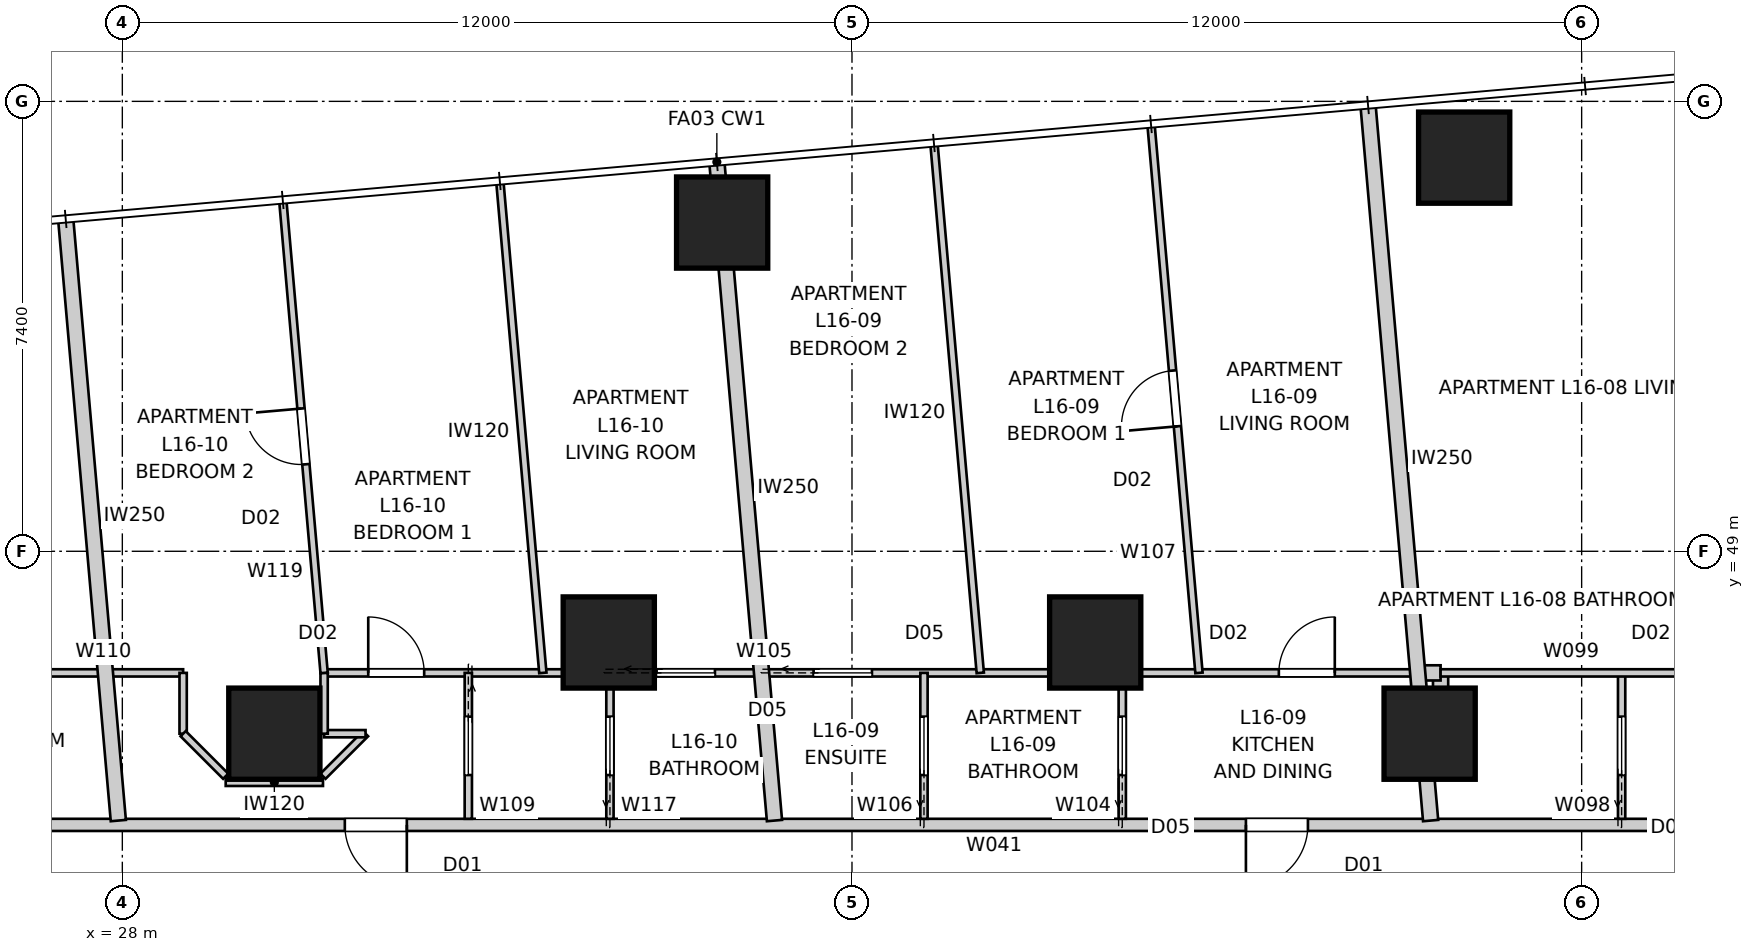
"""IFC4 building model, lengths in metres.
Left out: names, types, materials, properties, quantities, classifications, styles, units other than length and angle.
Written with IfcOpenShell. Run it as: python <this file> out.ifc"""

import sys

from ifc_helpers import new_model, si_unit, direction, frame, frame_2d, origin, origin_2d, place, context, subcontext, project, spatial, rectangle, extrude, element, fill, save


model = new_model("IFC4")
c1 = context("Model", 3, precision=1e-05, world=origin(), true_north=direction((0.0, 1.0)))
c2 = subcontext(c1, "Body", "Model", "MODEL_VIEW")
j1 = project(units=[si_unit("LENGTHUNIT", "METRE"), si_unit("PLANEANGLEUNIT", "RADIAN")], contexts=[c1])
p1 = place(None, origin())
s1 = spatial("IfcSite", under=j1, at=p1, CompositionType="ELEMENT")
p2 = place(p1, origin())
s2 = spatial("IfcBuilding", under=s1, at=p2, CompositionType="ELEMENT")
p3 = place(p2, frame((0.0, 0.0, 60.8)))
s3 = spatial("IfcBuildingStorey", under=s2, at=p3, CompositionType="ELEMENT", Elevation=60.8)
for number, where, z_axis, x_axis in (
    (1, (50.068, 55.474, 0.0), (0.0, 0.0, 1.0), (1.0, 0.0, 0.0)),
    (2, (37.865, 54.407, 0.0), (0.0, 0.0, 1.0), (1.0, 0.0, 0.0)),
    (3, (49.5, 46.0, 0.0), (0.0, 0.0, 1.0), (1.0, 0.0, 0.0)),
    (4, (44.0, 47.5, 0.0), (0.0, 0.0, 1.0), (1.0, 0.0, 0.0)),
    (5, (36.0, 47.5, 0.0), (0.0, 0.0, 1.0), (1.0, 0.0, 0.0)),
    (6, (30.5, 46.0, 0.0), (0.0, 0.0, 1.0), (1.0, 0.0, 0.0)),
):
    element("IfcColumn", number, at=place(p3, frame(where, z_axis=z_axis, x_axis=x_axis)), inside=s3, PredefinedType="COLUMN", context=c2, shape_type="SweptSolid", body=[
        extrude(rectangle(XDim=1.5, YDim=1.5, at=origin_2d()), origin(), (0.0, 0.0, 1.0), 3.4),
    ])
p4 = place(p3, frame((53.7, 44.5, 0.0), z_axis=(0.0, 0.0, 1.0), x_axis=(-1.0, 0.0, 0.0)))
e7 = element("IfcWall", 7, at=p4, inside=s3, PredefinedType="PARTITIONING", context=c2, shape_type="SweptSolid", body=[
    extrude(rectangle(XDim=27.4, YDim=0.2, at=frame_2d((13.7, 0.0))), origin(), (0.0, 0.0, 1.0), 3.25),
])
p5 = place(p4, frame((21.021, 0.0, 0.0)))
e8 = element("IfcOpeningElement", 8, at=p5, cuts=e7, PredefinedType="OPENING", context=c2, shape_type="SweptSolid", body=[
    extrude(rectangle(XDim=1.02, YDim=2.34, at=frame_2d((0.51, 1.17))), frame((0.0, 0.11, 0.0), z_axis=(0.0, -1.0, 0.0), x_axis=(1.0, 0.0, 0.0)), (0.0, 0.0, 1.0), 0.22),
])
p6 = place(p4, frame((6.201, 0.0, 0.0)))
e9 = element("IfcOpeningElement", 9, at=p6, cuts=e7, PredefinedType="OPENING", context=c2, shape_type="SweptSolid", body=[
    extrude(rectangle(XDim=1.02, YDim=2.34, at=frame_2d((0.51, 1.17))), frame((0.0, 0.11, 0.0), z_axis=(0.0, -1.0, 0.0), x_axis=(1.0, 0.0, 0.0)), (0.0, 0.0, 1.0), 0.22),
])
p7 = place(p3, frame((37.778, 55.403, 0.0), z_axis=(0.0, 0.0, 1.0), x_axis=(0.087140211333, -0.996196056792, 0.0)))
e10 = element("IfcWall", 10, at=p7, inside=s3, PredefinedType="PARTITIONING", context=c2, shape_type="SweptSolid", body=[
    extrude(rectangle(XDim=10.873, YDim=0.25, at=frame_2d((5.437, 0.0))), origin(), (0.0, 0.0, 1.0), 3.25),
])
p8 = place(p3, frame((48.487, 56.34, 0.0), z_axis=(0.0, 0.0, 1.0), x_axis=(0.087168232078, -0.996193605338, 0.0)))
e11 = element("IfcWall", 11, at=p8, inside=s3, PredefinedType="PARTITIONING", context=c2, shape_type="SweptSolid", body=[
    extrude(rectangle(XDim=11.814, YDim=0.25, at=frame_2d((5.907, 0.0))), origin(), (0.0, 0.0, 1.0), 3.25),
])
p9 = place(p3, frame((27.068, 54.466, 0.0), z_axis=(0.0, 0.0, 1.0), x_axis=(0.087157803114, -0.996194517831, 0.0)))
e12 = element("IfcWall", 12, at=p9, inside=s3, PredefinedType="PARTITIONING", context=c2, shape_type="SweptSolid", body=[
    extrude(rectangle(XDim=9.933, YDim=0.25, at=frame_2d((4.966, 0.0))), origin(), (0.0, 0.0, 1.0), 3.25),
])
p10 = place(p3, frame((49.68, 47.0, 0.0), z_axis=(0.0, 0.0, 1.0), x_axis=(0.0, -1.0, 0.0)))
e13 = element("IfcWall", 13, at=p10, inside=s3, PredefinedType="PARTITIONING", context=c2, shape_type="SweptSolid", body=[
    extrude(rectangle(XDim=1.549, YDim=0.25, at=frame_2d((0.774, 0.0))), origin(), (0.0, 0.0, 1.0), 3.25),
])
p11 = place(p3, frame((49.328, 47.0, 0.0), z_axis=(0.0, 0.0, 1.0), x_axis=(0.999999759208, -0.000693962359, 0.0)))
e14 = element("IfcWall", 14, at=p11, inside=s3, PredefinedType="PARTITIONING", context=c2, shape_type="SweptSolid", body=[
    extrude(rectangle(XDim=0.352, YDim=0.25, at=frame_2d((0.176, 0.0))), origin(), (0.0, 0.0, 1.0), 3.25),
])
p12 = place(p3, frame((52.657, 44.6, 0.0), z_axis=(0.0, 0.0, 1.0), x_axis=(0.0, 1.0, 0.0)))
e15 = element("IfcWall", 15, at=p12, inside=s3, PredefinedType="PARTITIONING", context=c2, shape_type="SweptSolid", body=[
    extrude(rectangle(XDim=2.4, YDim=0.12, at=frame_2d((1.2, 0.0))), origin(), (0.0, 0.0, 1.0), 3.25),
])
p13 = place(p12, frame((0.72, 0.0, 0.0)))
e16 = element("IfcOpeningElement", 16, at=p13, cuts=e15, PredefinedType="OPENING", context=c2, shape_type="SweptSolid", body=[
    extrude(rectangle(XDim=0.96, YDim=2.1, at=frame_2d((0.48, 1.05))), frame((0.0, 0.07, 0.0), z_axis=(0.0, -1.0, 0.0), x_axis=(1.0, 0.0, 0.0)), (0.0, 0.0, 1.0), 0.14),
])
p14 = place(p3, frame((49.68, 47.0, 0.0), z_axis=(0.0, 0.0, 1.0), x_axis=(1.0, 0.0, 0.0)))
e17 = element("IfcWall", 17, at=p14, inside=s3, PredefinedType="PARTITIONING", context=c2, shape_type="SweptSolid", body=[
    extrude(rectangle(XDim=6.52, YDim=0.12, at=frame_2d((3.26, 0.0))), origin(), (0.0, 0.0, 1.0), 3.25),
])
p15 = place(p14, frame((4.289, 0.0, 0.0)))
e18 = element("IfcOpeningElement", 18, at=p15, cuts=e17, PredefinedType="OPENING", context=c2, shape_type="SweptSolid", body=[
    extrude(rectangle(XDim=0.92, YDim=2.34, at=frame_2d((0.46, 1.17))), frame((0.0, 0.07, 0.0), z_axis=(0.0, -1.0, 0.0), x_axis=(1.0, 0.0, 0.0)), (0.0, 0.0, 1.0), 0.14),
])
p16 = place(p3, frame((44.445, 44.6, 0.0), z_axis=(0.0, 0.0, 1.0), x_axis=(0.0, 1.0, 0.0)))
e19 = element("IfcWall", 19, at=p16, inside=s3, PredefinedType="PARTITIONING", context=c2, shape_type="SweptSolid", body=[
    extrude(rectangle(XDim=2.4, YDim=0.12, at=frame_2d((1.2, 0.0))), origin(), (0.0, 0.0, 1.0), 3.25),
])
p17 = place(p16, frame((0.72, 0.0, 0.0)))
e20 = element("IfcOpeningElement", 20, at=p17, cuts=e19, PredefinedType="OPENING", context=c2, shape_type="SweptSolid", body=[
    extrude(rectangle(XDim=0.96, YDim=2.1, at=frame_2d((0.48, 1.05))), frame((0.0, 0.07, 0.0), z_axis=(0.0, -1.0, 0.0), x_axis=(1.0, 0.0, 0.0)), (0.0, 0.0, 1.0), 0.14),
])
p18 = place(p3, frame((31.319, 47.0, 0.0), z_axis=(0.0, 0.0, 1.0), x_axis=(1.0, 0.0, 0.0)))
e21 = element("IfcWall", 21, at=p18, inside=s3, PredefinedType="PARTITIONING", context=c2, shape_type="SweptSolid", body=[
    extrude(rectangle(XDim=17.985, YDim=0.12, at=frame_2d((8.993, 0.0))), origin(), (0.0, 0.0, 1.0), 2.55),
])
p19 = place(p18, frame((0.726, 0.0, 0.0)))
e22 = element("IfcOpeningElement", 22, at=p19, cuts=e21, PredefinedType="OPENING", context=c2, shape_type="SweptSolid", body=[
    extrude(rectangle(XDim=0.92, YDim=2.34, at=frame_2d((0.46, 1.17))), frame((0.0, 0.07, 0.0), z_axis=(0.0, -1.0, 0.0), x_axis=(1.0, 0.0, 0.0)), (0.0, 0.0, 1.0), 0.14),
])
p20 = place(p18, frame((15.701, 0.0, 0.0)))
e23 = element("IfcOpeningElement", 23, at=p20, cuts=e21, PredefinedType="OPENING", context=c2, shape_type="SweptSolid", body=[
    extrude(rectangle(XDim=0.92, YDim=2.34, at=frame_2d((0.46, 1.17))), frame((0.0, 0.07, 0.0), z_axis=(0.0, -1.0, 0.0), x_axis=(1.0, 0.0, 0.0)), (0.0, 0.0, 1.0), 0.14),
])
p21 = place(p18, frame((5.467, 0.0, 0.0)))
e24 = element("IfcOpeningElement", 24, at=p21, cuts=e21, PredefinedType="OPENING", context=c2, shape_type="SweptSolid", body=[
    extrude(rectangle(XDim=0.96, YDim=2.1, at=frame_2d((0.48, 1.05))), frame((0.0, 0.07, 0.0), z_axis=(0.0, -1.0, 0.0), x_axis=(1.0, 0.0, 0.0)), (0.0, 0.0, 1.0), 0.14),
])
p22 = place(p18, frame((8.05, 0.0, 0.0)))
e25 = element("IfcOpeningElement", 25, at=p22, cuts=e21, PredefinedType="OPENING", context=c2, shape_type="SweptSolid", body=[
    extrude(rectangle(XDim=0.96, YDim=2.1, at=frame_2d((0.48, 1.05))), frame((0.0, 0.07, 0.0), z_axis=(0.0, -1.0, 0.0), x_axis=(1.0, 0.0, 0.0)), (0.0, 0.0, 1.0), 0.14),
])
p23 = place(p3, frame((41.184, 44.6, 0.0), z_axis=(0.0, 0.0, 1.0), x_axis=(0.0, 1.0, 0.0)))
e26 = element("IfcWall", 26, at=p23, inside=s3, PredefinedType="PARTITIONING", context=c2, shape_type="SweptSolid", body=[
    extrude(rectangle(XDim=2.4, YDim=0.12, at=frame_2d((1.2, 0.0))), origin(), (0.0, 0.0, 1.0), 3.25),
])
p24 = place(p23, frame((0.72, 0.0, 0.0)))
e27 = element("IfcOpeningElement", 27, at=p24, cuts=e26, PredefinedType="OPENING", context=c2, shape_type="SweptSolid", body=[
    extrude(rectangle(XDim=0.96, YDim=2.1, at=frame_2d((0.48, 1.05))), frame((0.0, 0.07, 0.0), z_axis=(0.0, -1.0, 0.0), x_axis=(1.0, 0.0, 0.0)), (0.0, 0.0, 1.0), 0.14),
])
p25 = place(p3, frame((45.707, 47.0, 0.0), z_axis=(0.0, 0.0, 1.0), x_axis=(-0.087160907995, 0.996194246178, 0.0)))
e28 = element("IfcWall", 28, at=p25, inside=s3, PredefinedType="PARTITIONING", context=c2, shape_type="SweptSolid", body=[
    extrude(rectangle(XDim=9.022, YDim=0.12, at=frame_2d((4.511, 0.0))), origin(), (0.0, 0.0, 1.0), 3.25),
])
p26 = place(p25, frame((4.071, 0.0, 0.0)))
e29 = element("IfcOpeningElement", 29, at=p26, cuts=e28, PredefinedType="OPENING", context=c2, shape_type="SweptSolid", body=[
    extrude(rectangle(XDim=0.92, YDim=2.34, at=frame_2d((0.46, 1.17))), frame((0.0, 0.07, 0.0), z_axis=(0.0, -1.0, 0.0), x_axis=(1.0, 0.0, 0.0)), (0.0, 0.0, 1.0), 0.14),
])
p27 = place(p3, frame((42.11, 47.0, 0.0), z_axis=(0.0, 0.0, 1.0), x_axis=(-0.087158256162, 0.996194478193, 0.0)))
e30 = element("IfcWall", 30, at=p27, inside=s3, PredefinedType="PARTITIONING", context=c2, shape_type="SweptSolid", body=[
    extrude(rectangle(XDim=8.709, YDim=0.12, at=frame_2d((4.354, 0.0))), origin(), (0.0, 0.0, 1.0), 3.25),
])
p28 = place(p3, frame((33.69, 47.0, 0.0), z_axis=(0.0, 0.0, 1.0), x_axis=(0.0, -1.0, 0.0)))
e31 = element("IfcWall", 31, at=p28, inside=s3, PredefinedType="PARTITIONING", context=c2, shape_type="SweptSolid", body=[
    extrude(rectangle(XDim=2.4, YDim=0.12, at=frame_2d((1.2, 0.0))), origin(), (0.0, 0.0, 1.0), 3.25),
])
p29 = place(p28, frame((0.72, 0.0, 0.0)))
e32 = element("IfcOpeningElement", 32, at=p29, cuts=e31, PredefinedType="OPENING", context=c2, shape_type="SweptSolid", body=[
    extrude(rectangle(XDim=0.96, YDim=2.1, at=frame_2d((0.48, 1.05))), frame((0.0, 0.07, 0.0), z_axis=(0.0, -1.0, 0.0), x_axis=(1.0, 0.0, 0.0)), (0.0, 0.0, 1.0), 0.14),
])
p30 = place(p3, frame((23.8, 47.0, 0.0), z_axis=(0.0, 0.0, 1.0), x_axis=(1.0, 0.0, 0.0)))
e33 = element("IfcWall", 33, at=p30, inside=s3, PredefinedType="PARTITIONING", context=c2, shape_type="SweptSolid", body=[
    extrude(rectangle(XDim=5.2, YDim=0.12, at=frame_2d((2.6, 0.0))), origin(), (0.0, 0.0, 1.0), 3.25),
])
p31 = place(p30, frame((1.618, 0.0, 0.0)))
e34 = element("IfcOpeningElement", 34, at=p31, cuts=e33, PredefinedType="OPENING", context=c2, shape_type="SweptSolid", body=[
    extrude(rectangle(XDim=0.96, YDim=2.1, at=frame_2d((0.48, 1.05))), frame((0.0, 0.07, 0.0), z_axis=(0.0, -1.0, 0.0), x_axis=(1.0, 0.0, 0.0)), (0.0, 0.0, 1.0), 0.14),
])
p32 = place(p3, frame((29.0, 47.0, 0.0), z_axis=(0.0, 0.0, 1.0), x_axis=(0.0, -1.0, 0.0)))
e35 = element("IfcWall", 35, at=p32, inside=s3, PredefinedType="PARTITIONING", context=c2, shape_type="SweptSolid", body=[
    extrude(rectangle(XDim=1.0, YDim=0.12, at=frame_2d((0.5, 0.0))), origin(), (0.0, 0.0, 1.0), 3.25),
])
p33 = place(p3, frame((29.0, 46.0, 0.0), z_axis=(0.0, 0.0, 1.0), x_axis=(0.707106781187, -0.707106781187, 0.0)))
e36 = element("IfcWall", 36, at=p33, inside=s3, PredefinedType="PARTITIONING", context=c2, shape_type="SweptSolid", body=[
    extrude(rectangle(XDim=0.99, YDim=0.12, at=frame_2d((0.495, 0.0))), origin(), (0.0, 0.0, 1.0), 3.25),
])
p34 = place(p3, frame((29.7, 45.2, 0.0), z_axis=(0.0, 0.0, 1.0), x_axis=(1.0, 0.0, 0.0)))
e37 = element("IfcWall", 37, at=p34, inside=s3, PredefinedType="PARTITIONING", context=c2, shape_type="SweptSolid", body=[
    extrude(rectangle(XDim=1.6, YDim=0.12, at=frame_2d((0.8, 0.0))), origin(), (0.0, 0.0, 1.0), 3.25),
])
p35 = place(p3, frame((31.3, 45.3, 0.0), z_axis=(0.0, 0.0, 1.0), x_axis=(0.707106781187, 0.707106781187, 0.0)))
e38 = element("IfcWall", 38, at=p35, inside=s3, PredefinedType="PARTITIONING", context=c2, shape_type="SweptSolid", body=[
    extrude(rectangle(XDim=0.99, YDim=0.12, at=frame_2d((0.495, 0.0))), origin(), (0.0, 0.0, 1.0), 3.25),
])
p36 = place(p3, frame((32.0, 46.0, 0.0), z_axis=(0.0, 0.0, 1.0), x_axis=(-1.0, 0.0, 0.0)))
e39 = element("IfcWall", 39, at=p36, inside=s3, PredefinedType="PARTITIONING", context=c2, shape_type="SweptSolid", body=[
    extrude(rectangle(XDim=0.681, YDim=0.12, at=frame_2d((0.341, 0.0))), origin(), (0.0, 0.0, 1.0), 3.25),
])
p37 = place(p3, frame((31.319, 46.0, 0.0), z_axis=(0.0, 0.0, 1.0), x_axis=(0.0, 1.0, 0.0)))
e40 = element("IfcWall", 40, at=p37, inside=s3, PredefinedType="PARTITIONING", context=c2, shape_type="SweptSolid", body=[
    extrude(rectangle(XDim=1.0, YDim=0.12, at=frame_2d((0.5, 0.0))), origin(), (0.0, 0.0, 1.0), 3.25),
])
p38 = place(p3, frame((36.019, 44.6, 0.0), z_axis=(0.0, 0.0, 1.0), x_axis=(0.0, 1.0, 0.0)))
e41 = element("IfcWall", 41, at=p38, inside=s3, PredefinedType="PARTITIONING", context=c2, shape_type="SweptSolid", body=[
    extrude(rectangle(XDim=2.4, YDim=0.12, at=frame_2d((1.2, 0.0))), origin(), (0.0, 0.0, 1.0), 3.25),
])
p39 = place(p38, frame((0.72, 0.0, 0.0)))
e42 = element("IfcOpeningElement", 42, at=p39, cuts=e41, PredefinedType="OPENING", context=c2, shape_type="SweptSolid", body=[
    extrude(rectangle(XDim=0.96, YDim=2.1, at=frame_2d((0.48, 1.05))), frame((0.0, 0.07, 0.0), z_axis=(0.0, -1.0, 0.0), x_axis=(1.0, 0.0, 0.0)), (0.0, 0.0, 1.0), 0.14),
])
p40 = place(p3, frame((34.916, 47.0, 0.0), z_axis=(0.0, 0.0, 1.0), x_axis=(-0.087184938313, 0.99619214338, 0.0)))
e43 = element("IfcWall", 43, at=p40, inside=s3, PredefinedType="PARTITIONING", context=c2, shape_type="SweptSolid", body=[
    extrude(rectangle(XDim=8.082, YDim=0.12, at=frame_2d((4.041, 0.0))), origin(), (0.0, 0.0, 1.0), 3.25),
])
p41 = place(p3, frame((31.319, 47.0, 0.0), z_axis=(0.0, 0.0, 1.0), x_axis=(-0.0871517452, 0.996195047824, 0.0)))
e44 = element("IfcWall", 44, at=p41, inside=s3, PredefinedType="PARTITIONING", context=c2, shape_type="SweptSolid", body=[
    extrude(rectangle(XDim=7.768, YDim=0.12, at=frame_2d((3.884, 0.0))), origin(), (0.0, 0.0, 1.0), 3.25),
])
p42 = place(p41, frame((3.444, 0.0, 0.0)))
e45 = element("IfcOpeningElement", 45, at=p42, cuts=e44, PredefinedType="OPENING", context=c2, shape_type="SweptSolid", body=[
    extrude(rectangle(XDim=0.92, YDim=2.34, at=frame_2d((0.46, 1.17))), frame((0.0, 0.07, 0.0), z_axis=(0.0, -1.0, 0.0), x_axis=(1.0, 0.0, 0.0)), (0.0, 0.0, 1.0), 0.14),
])
p43 = place(p5, origin())
e46 = element("IfcDoor", 46, at=p43, inside=s3, OperationType="SINGLE_SWING_LEFT", PredefinedType="DOOR", context=c2, shape_type="SweptSolid", body=[
    extrude(rectangle(XDim=1.02, YDim=2.34, at=frame_2d((0.51, 1.17))), frame((0.0, 0.025, 0.0), z_axis=(0.0, -1.0, 0.0), x_axis=(1.0, 0.0, 0.0)), (0.0, 0.0, 1.0), 0.05),
])
fill(e8, e46)
p44 = place(p6, origin())
e47 = element("IfcDoor", 47, at=p44, inside=s3, OperationType="SINGLE_SWING_RIGHT", PredefinedType="DOOR", context=c2, shape_type="SweptSolid", body=[
    extrude(rectangle(XDim=1.02, YDim=2.34, at=frame_2d((0.51, 1.17))), frame((0.0, 0.025, 0.0), z_axis=(0.0, -1.0, 0.0), x_axis=(1.0, 0.0, 0.0)), (0.0, 0.0, 1.0), 0.05),
])
fill(e9, e47)
p45 = place(p29, origin())
e48 = element("IfcDoor", 48, at=p45, inside=s3, OperationType="SLIDING_TO_LEFT", PredefinedType="DOOR", context=c2, shape_type="SweptSolid", body=[
    extrude(rectangle(XDim=0.96, YDim=2.1, at=frame_2d((0.48, 1.05))), frame((0.0, 0.025, 0.0), z_axis=(0.0, -1.0, 0.0), x_axis=(1.0, 0.0, 0.0)), (0.0, 0.0, 1.0), 0.05),
])
fill(e32, e48)
p46 = place(p19, origin())
e49 = element("IfcDoor", 49, at=p46, inside=s3, OperationType="SINGLE_SWING_LEFT", PredefinedType="DOOR", context=c2, shape_type="SweptSolid", body=[
    extrude(rectangle(XDim=0.92, YDim=2.34, at=frame_2d((0.46, 1.17))), frame((0.0, 0.025, 0.0), z_axis=(0.0, -1.0, 0.0), x_axis=(1.0, 0.0, 0.0)), (0.0, 0.0, 1.0), 0.05),
])
fill(e22, e49)
p47 = place(p20, origin())
e50 = element("IfcDoor", 50, at=p47, inside=s3, OperationType="SINGLE_SWING_RIGHT", PredefinedType="DOOR", context=c2, shape_type="SweptSolid", body=[
    extrude(rectangle(XDim=0.92, YDim=2.34, at=frame_2d((0.46, 1.17))), frame((0.0, 0.025, 0.0), z_axis=(0.0, -1.0, 0.0), x_axis=(1.0, 0.0, 0.0)), (0.0, 0.0, 1.0), 0.05),
])
fill(e23, e50)
p48 = place(p17, origin())
e51 = element("IfcDoor", 51, at=p48, inside=s3, OperationType="SLIDING_TO_LEFT", PredefinedType="DOOR", context=c2, shape_type="SweptSolid", body=[
    extrude(rectangle(XDim=0.96, YDim=2.1, at=frame_2d((0.48, 1.05))), frame((0.0, 0.025, 0.0), z_axis=(0.0, -1.0, 0.0), x_axis=(1.0, 0.0, 0.0)), (0.0, 0.0, 1.0), 0.05),
])
fill(e20, e51)
p49 = place(p13, origin())
e52 = element("IfcDoor", 52, at=p49, inside=s3, OperationType="SLIDING_TO_LEFT", PredefinedType="DOOR", context=c2, shape_type="SweptSolid", body=[
    extrude(rectangle(XDim=0.96, YDim=2.1, at=frame_2d((0.48, 1.05))), frame((0.0, 0.025, 0.0), z_axis=(0.0, -1.0, 0.0), x_axis=(1.0, 0.0, 0.0)), (0.0, 0.0, 1.0), 0.05),
])
fill(e16, e52)
p50 = place(p39, origin())
e53 = element("IfcDoor", 53, at=p50, inside=s3, OperationType="SLIDING_TO_LEFT", PredefinedType="DOOR", context=c2, shape_type="SweptSolid", body=[
    extrude(rectangle(XDim=0.96, YDim=2.1, at=frame_2d((0.48, 1.05))), frame((0.0, 0.025, 0.0), z_axis=(0.0, -1.0, 0.0), x_axis=(1.0, 0.0, 0.0)), (0.0, 0.0, 1.0), 0.05),
])
fill(e42, e53)
p51 = place(p26, origin())
e54 = element("IfcDoor", 54, at=p51, inside=s3, OperationType="SINGLE_SWING_LEFT", PredefinedType="DOOR", context=c2, shape_type="SweptSolid", body=[
    extrude(rectangle(XDim=0.92, YDim=2.34, at=frame_2d((0.46, 1.17))), frame((0.0, 0.025, 0.0), z_axis=(0.0, -1.0, 0.0), x_axis=(1.0, 0.0, 0.0)), (0.0, 0.0, 1.0), 0.05),
])
fill(e29, e54)
p52 = place(p24, origin())
e55 = element("IfcDoor", 55, at=p52, inside=s3, OperationType="SLIDING_TO_LEFT", PredefinedType="DOOR", context=c2, shape_type="SweptSolid", body=[
    extrude(rectangle(XDim=0.96, YDim=2.1, at=frame_2d((0.48, 1.05))), frame((0.0, 0.025, 0.0), z_axis=(0.0, -1.0, 0.0), x_axis=(1.0, 0.0, 0.0)), (0.0, 0.0, 1.0), 0.05),
])
fill(e27, e55)
p53 = place(p21, origin())
e56 = element("IfcDoor", 56, at=p53, inside=s3, OperationType="SLIDING_TO_LEFT", PredefinedType="DOOR", context=c2, shape_type="SweptSolid", body=[
    extrude(rectangle(XDim=0.96, YDim=2.1, at=frame_2d((0.48, 1.05))), frame((0.0, 0.025, 0.0), z_axis=(0.0, -1.0, 0.0), x_axis=(1.0, 0.0, 0.0)), (0.0, 0.0, 1.0), 0.05),
])
fill(e24, e56)
p54 = place(p22, origin())
e57 = element("IfcDoor", 57, at=p54, inside=s3, OperationType="SLIDING_TO_LEFT", PredefinedType="DOOR", context=c2, shape_type="SweptSolid", body=[
    extrude(rectangle(XDim=0.96, YDim=2.1, at=frame_2d((0.48, 1.05))), frame((0.0, 0.025, 0.0), z_axis=(0.0, -1.0, 0.0), x_axis=(1.0, 0.0, 0.0)), (0.0, 0.0, 1.0), 0.05),
])
fill(e25, e57)
p55 = place(p42, origin())
e58 = element("IfcDoor", 58, at=p55, inside=s3, OperationType="SINGLE_SWING_RIGHT", PredefinedType="DOOR", context=c2, shape_type="SweptSolid", body=[
    extrude(rectangle(XDim=0.92, YDim=2.34, at=frame_2d((0.46, 1.17))), frame((0.0, 0.025, 0.0), z_axis=(0.0, -1.0, 0.0), x_axis=(1.0, 0.0, 0.0)), (0.0, 0.0, 1.0), 0.05),
])
fill(e45, e58)
save(model, sys.argv[1])
